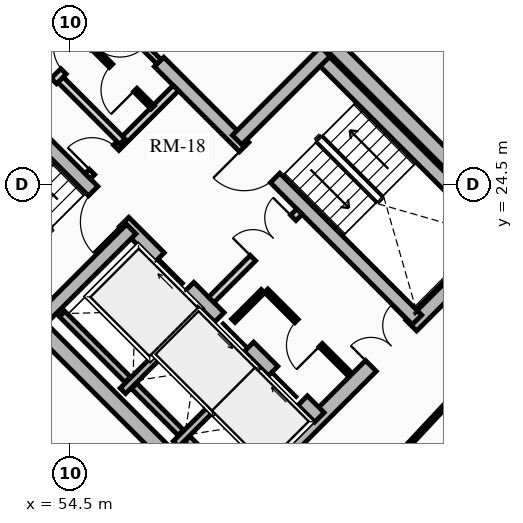
"""IFC4 building model, lengths in metres.
Left out: names, types, materials, properties, quantities, classifications, styles, units other than length and angle.
Written with IfcOpenShell. Run it as: python <this file> out.ifc"""

import sys

from ifc_helpers import new_model, si_unit, direction, frame, frame_2d, origin, place, context, subcontext, project, spatial, rectangle, extrude, source, transform, mapped, element, fill, save


model = new_model("IFC4")
c1 = context("Model", 3, precision=1e-05, world=origin(), true_north=direction((0.0, 1.0)))
c2 = subcontext(c1, "Body", "Model", "MODEL_VIEW")
j1 = project(units=[si_unit("LENGTHUNIT", "METRE"), si_unit("PLANEANGLEUNIT", "RADIAN")], contexts=[c1])
p1 = place(None, origin())
s1 = spatial("IfcSite", under=j1, at=p1, CompositionType="ELEMENT")
p2 = place(p1, origin())
s2 = spatial("IfcBuilding", under=s1, at=p2, CompositionType="ELEMENT")
p3 = place(p2, frame((0.0, 0.0, 202.48)))
s3 = spatial("IfcBuildingStorey", under=s2, at=p3, CompositionType="ELEMENT", Elevation=202.48)
for number, where, z_axis, x_axis in (
    (1, (58.702, 15.732, 0.0), (0.0, 0.0, 1.0), (-0.707, 0.707, 0.0)),
    (2, (66.268, 23.298, 0.0), (0.0, 0.0, 1.0), (-0.707, 0.707, 0.0)),
):
    element("IfcWall", number, at=place(p3, frame(where, z_axis=z_axis, x_axis=x_axis)), inside=s3, PredefinedType="SHEAR", context=c2, shape_type="SweptSolid", body=[
        extrude(rectangle(XDim=14.1, YDim=0.4, at=frame_2d((7.05, 0.0))), origin(), (0.0, 0.0, 1.0), 2.91),
    ])
p4 = place(p3, frame((58.561, 15.873, 0.0), z_axis=(0.0, 0.0, 1.0), x_axis=(0.707106781187, 0.707106781187, 0.0)))
e3 = element("IfcWall", 3, at=p4, inside=s3, PredefinedType="SHEAR", context=c2, shape_type="SweptSolid", body=[
    extrude(rectangle(XDim=10.7, YDim=0.4, at=frame_2d((5.35, 0.0))), origin(), (0.0, 0.0, 1.0), 2.91),
])
m1 = source(origin(), c2, "Body", "SweptSolid", [
    extrude(rectangle(XDim=1.5, YDim=2.02, at=frame_2d((0.75, 1.01))), frame((0.0, 0.21, 0.0), z_axis=(0.0, -1.0, 0.0), x_axis=(1.0, 0.0, 0.0)), (0.0, 0.0, 1.0), 0.42),
])
p5 = place(p4, frame((5.45, 0.0, 0.0)))
e4 = element("IfcOpeningElement", 4, at=p5, cuts=e3, PredefinedType="OPENING", context=c2, shape_type="MappedRepresentation", body=[
    mapped(m1, transform((0.0, 0.0, 0.0), x_axis=(1.0, 0.0, 0.0), y_axis=(0.0, 1.0, 0.0), z_axis=(0.0, 0.0, 1.0), scale=1.0)),
])
p6 = place(p3, frame((48.873, 25.561, 0.0), z_axis=(0.0, 0.0, 1.0), x_axis=(0.707106781187, 0.707106781187, 0.0)))
e5 = element("IfcWall", 5, at=p6, inside=s3, PredefinedType="SHEAR", context=c2, shape_type="SweptSolid", body=[
    extrude(rectangle(XDim=10.7, YDim=0.4, at=frame_2d((5.35, 0.0))), origin(), (0.0, 0.0, 1.0), 2.91),
])
p7 = place(p6, frame((4.6, 0.0, 0.0)))
e6 = element("IfcOpeningElement", 6, at=p7, cuts=e5, PredefinedType="OPENING", context=c2, shape_type="MappedRepresentation", body=[
    mapped(m1, transform((0.0, 0.0, 0.0), x_axis=(1.0, 0.0, 0.0), y_axis=(0.0, 1.0, 0.0), z_axis=(0.0, 0.0, 1.0), scale=1.0)),
])
p8 = place(p3, frame((61.06, 18.373, 0.0), z_axis=(0.0, 0.0, 1.0), x_axis=(-0.707106781187, 0.707106781187, 0.0)))
e7 = element("IfcWall", 7, at=p8, inside=s3, PredefinedType="SHEAR", context=c2, shape_type="SweptSolid", body=[
    extrude(rectangle(XDim=13.7, YDim=0.35, at=frame_2d((6.85, 0.0))), origin(), (0.0, 0.0, 1.0), 2.91),
])
m2 = source(origin(), c2, "Body", "SweptSolid", [
    extrude(rectangle(XDim=1.1, YDim=2.015, at=frame_2d((0.55, 1.007))), frame((0.0, 0.185, 0.0), z_axis=(0.0, -1.0, 0.0), x_axis=(1.0, 0.0, 0.0)), (0.0, 0.0, 1.0), 0.37),
])
p9 = place(p8, frame((4.85, 0.0, 0.0)))
e8 = element("IfcOpeningElement", 8, at=p9, cuts=e7, PredefinedType="OPENING", context=c2, shape_type="MappedRepresentation", body=[
    mapped(m2, transform((0.0, 0.0, 0.0), x_axis=(1.0, 0.0, 0.0), y_axis=(0.0, 1.0, 0.0), z_axis=(0.0, 0.0, 1.0), scale=1.0)),
])
p10 = place(p8, frame((0.625, 0.0, 0.0)))
e9 = element("IfcOpeningElement", 9, at=p10, cuts=e7, PredefinedType="OPENING", context=c2, shape_type="MappedRepresentation", body=[
    mapped(m2, transform((0.0, 0.0, 0.0), x_axis=(1.0, 0.0, 0.0), y_axis=(0.0, 1.0, 0.0), z_axis=(0.0, 0.0, 1.0), scale=1.0)),
])
p11 = place(p8, frame((2.625, 0.0, 0.0)))
e10 = element("IfcOpeningElement", 10, at=p11, cuts=e7, PredefinedType="OPENING", context=c2, shape_type="MappedRepresentation", body=[
    mapped(m2, transform((0.0, 0.0, 0.0), x_axis=(1.0, 0.0, 0.0), y_axis=(0.0, 1.0, 0.0), z_axis=(0.0, 0.0, 1.0), scale=1.0)),
])
m3 = source(origin(), c2, "Body", "SweptSolid", [
    extrude(rectangle(XDim=1.15, YDim=2.02, at=frame_2d((0.575, 1.01))), frame((0.0, 0.185, 0.0), z_axis=(0.0, -1.0, 0.0), x_axis=(1.0, 0.0, 0.0)), (0.0, 0.0, 1.0), 0.37),
])
p12 = place(p8, frame((7.27, 0.0, 0.0)))
e11 = element("IfcOpeningElement", 11, at=p12, cuts=e7, PredefinedType="OPENING", context=c2, shape_type="MappedRepresentation", body=[
    mapped(m3, transform((0.0, 0.0, 0.0), x_axis=(1.0, 0.0, 0.0), y_axis=(0.0, 1.0, 0.0), z_axis=(0.0, 0.0, 1.0), scale=1.0)),
])
p13 = place(p3, frame((63.627, 20.94, 0.0), z_axis=(0.0, 0.0, 1.0), x_axis=(-0.707119496762, 0.707094065383, 0.0)))
e12 = element("IfcWall", 12, at=p13, inside=s3, PredefinedType="SHEAR", context=c2, shape_type="SweptSolid", body=[
    extrude(rectangle(XDim=9.6, YDim=0.35, at=frame_2d((4.8, 0.0))), origin(), (0.0, 0.0, 1.0), 2.91),
])
p14 = place(p13, frame((5.28, 0.0, 0.0)))
e13 = element("IfcOpeningElement", 13, at=p14, cuts=e12, PredefinedType="OPENING", context=c2, shape_type="MappedRepresentation", body=[
    mapped(m3, transform((0.0, 0.0, 0.0), x_axis=(1.0, 0.0, 0.0), y_axis=(0.0, 1.0, 0.0), z_axis=(0.0, 0.0, 1.0), scale=1.0)),
])
p15 = place(p3, frame((53.922, 21.141, 0.0), z_axis=(0.0, 0.0, 1.0), x_axis=(-0.707106781187, 0.707106781187, 0.0)))
e14 = element("IfcWall", 14, at=p15, inside=s3, PredefinedType="SHEAR", context=c2, shape_type="SweptSolid", body=[
    extrude(rectangle(XDim=6.695, YDim=0.35, at=frame_2d((3.348, 0.0))), origin(), (0.0, 0.0, 1.0), 2.91),
])
p16 = place(p3, frame((53.784, 21.003, 0.0), z_axis=(0.0, 0.0, 1.0), x_axis=(0.707106781187, 0.707106781187, 0.0)))
e15 = element("IfcWall", 15, at=p16, inside=s3, PredefinedType="SHEAR", context=c2, shape_type="SweptSolid", body=[
    extrude(rectangle(XDim=3.285, YDim=0.35, at=frame_2d((1.643, 0.0))), origin(), (0.0, 0.0, 1.0), 2.91),
])
p17 = place(p3, frame((65.812, 23.125, 0.0), z_axis=(0.0, 0.0, 1.0), x_axis=(-0.707106781187, 0.707106781187, 0.0)))
e16 = element("IfcWall", 16, at=p17, inside=s3, PredefinedType="SHEAR", context=c2, shape_type="SweptSolid", body=[
    extrude(rectangle(XDim=6.695, YDim=0.35, at=frame_2d((3.348, 0.0))), origin(), (0.0, 0.0, 1.0), 2.91),
])
p18 = place(p3, frame((58.893, 25.674, 0.0), z_axis=(0.0, 0.0, 1.0), x_axis=(0.707106781187, 0.707106781187, 0.0)))
e17 = element("IfcWall", 17, at=p18, inside=s3, PredefinedType="SHEAR", context=c2, shape_type="SweptSolid", body=[
    extrude(rectangle(XDim=3.285, YDim=0.35, at=frame_2d((1.643, 0.0))), origin(), (0.0, 0.0, 1.0), 2.91),
])
p19 = place(p3, frame((55.888, 19.069, 0.0), z_axis=(0.0, 0.0, 1.0), x_axis=(0.707106781187, 0.707106781187, 0.0)))
e18 = element("IfcWall", 18, at=p19, inside=s3, PredefinedType="SHEAR", context=c2, shape_type="SweptSolid", body=[
    extrude(rectangle(XDim=2.97, YDim=0.2, at=frame_2d((1.485, 0.0))), origin(), (0.0, 0.0, 1.0), 2.91),
])
p20 = place(p3, frame((56.015, 19.366, 0.0), z_axis=(0.0, 0.0, 1.0), x_axis=(-0.707106781187, 0.707106781187, 0.0)))
e19 = element("IfcWall", 19, at=p20, inside=s3, PredefinedType="SHEAR", context=c2, shape_type="SweptSolid", body=[
    extrude(rectangle(XDim=2.44, YDim=0.2, at=frame_2d((1.22, 0.0))), origin(), (0.0, 0.0, 1.0), 2.91),
])
p21 = place(p3, frame((57.284, 17.673, 0.0), z_axis=(0.0, 0.0, 1.0), x_axis=(0.707147878904, 0.70706568108, 0.0)))
e20 = element("IfcWall", 20, at=p21, inside=s3, PredefinedType="SHEAR", context=c2, shape_type="SweptSolid", body=[
    extrude(rectangle(XDim=2.97, YDim=0.2, at=frame_2d((1.485, 0.0))), origin(), (0.0, 0.0, 1.0), 2.91),
])
p22 = place(p3, frame((57.412, 17.97, 0.0), z_axis=(0.0, 0.0, 1.0), x_axis=(-0.707106781187, 0.707106781187, 0.0)))
e21 = element("IfcWall", 21, at=p22, inside=s3, PredefinedType="SHEAR", context=c2, shape_type="SweptSolid", body=[
    extrude(rectangle(XDim=1.735, YDim=0.2, at=frame_2d((0.867, 0.0))), origin(), (0.0, 0.0, 1.0), 2.91),
])
p23 = place(p3, frame((58.737, 16.644, 0.0), z_axis=(0.0, 0.0, 1.0), x_axis=(-0.707032117043, 0.707181437447, 0.0)))
e22 = element("IfcWall", 22, at=p23, inside=s3, PredefinedType="SHEAR", context=c2, shape_type="SweptSolid", body=[
    extrude(rectangle(XDim=1.635, YDim=0.2, at=frame_2d((0.817, 0.0))), origin(), (0.0, 0.0, 1.0), 2.91),
])
p24 = place(p3, frame((58.214, 21.467, 0.0), z_axis=(0.0, 0.0, 1.0), x_axis=(0.707106781187, 0.707106781187, 0.0)))
e23 = element("IfcWall", 23, at=p24, inside=s3, PredefinedType="PARTITIONING", context=c2, shape_type="SweptSolid", body=[
    extrude(rectangle(XDim=3.28, YDim=0.2, at=frame_2d((1.64, 0.0))), origin(), (0.0, 0.0, 1.0), 2.685),
])
m4 = source(origin(), c2, "Body", "SweptSolid", [
    extrude(rectangle(XDim=1.5, YDim=2.02, at=frame_2d((0.75, 1.01))), frame((0.0, 0.11, 0.0), z_axis=(0.0, -1.0, 0.0), x_axis=(1.0, 0.0, 0.0)), (0.0, 0.0, 1.0), 0.22),
])
p25 = place(p24, frame((1.55, 0.0, 0.0)))
e24 = element("IfcOpeningElement", 24, at=p25, cuts=e23, PredefinedType="OPENING", context=c2, shape_type="MappedRepresentation", body=[
    mapped(m4, transform((0.0, 0.0, 0.0), x_axis=(1.0, 0.0, 0.0), y_axis=(0.0, 1.0, 0.0), z_axis=(0.0, 0.0, 1.0), scale=1.0)),
])
p26 = place(p3, frame((54.961, 24.719, 0.0), z_axis=(0.0, 0.0, 1.0), x_axis=(0.707106781187, 0.707106781187, 0.0)))
e25 = element("IfcWall", 25, at=p26, inside=s3, PredefinedType="PARTITIONING", context=c2, shape_type="SweptSolid", body=[
    extrude(rectangle(XDim=3.28, YDim=0.2, at=frame_2d((1.64, 0.0))), origin(), (0.0, 0.0, 1.0), 2.685),
])
m5 = source(origin(), c2, "Body", "SweptSolid", [
    extrude(rectangle(XDim=0.9, YDim=2.005, at=frame_2d((0.45, 1.002))), frame((0.0, 0.11, 0.0), z_axis=(0.0, -1.0, 0.0), x_axis=(1.0, 0.0, 0.0)), (0.0, 0.0, 1.0), 0.22),
])
p27 = place(p26, frame((0.16, 0.0, 0.0)))
e26 = element("IfcOpeningElement", 26, at=p27, cuts=e25, PredefinedType="OPENING", context=c2, shape_type="MappedRepresentation", body=[
    mapped(m5, transform((0.0, 0.0, 0.0), x_axis=(1.0, 0.0, 0.0), y_axis=(0.0, 1.0, 0.0), z_axis=(0.0, 0.0, 1.0), scale=1.0)),
])
p28 = place(p3, frame((55.874, 25.631, 0.0), z_axis=(0.0, 0.0, 1.0), x_axis=(-0.707157639372, 0.707055919343, 0.0)))
e27 = element("IfcWall", 27, at=p28, inside=s3, PredefinedType="PARTITIONING", context=c2, shape_type="SweptSolid", body=[
    extrude(rectangle(XDim=2.4, YDim=0.2, at=frame_2d((1.2, 0.0))), origin(), (0.0, 0.0, 1.0), 2.685),
])
p29 = place(p3, frame((53.264, 26.416, 0.0), z_axis=(0.0, 0.0, 1.0), x_axis=(0.707106781187, 0.707106781187, 0.0)))
e28 = element("IfcWall", 28, at=p29, inside=s3, PredefinedType="PARTITIONING", context=c2, shape_type="SweptSolid", body=[
    extrude(rectangle(XDim=3.28, YDim=0.2, at=frame_2d((1.64, 0.0))), origin(), (0.0, 0.0, 1.0), 2.685),
])
m6 = source(origin(), c2, "Body", "SweptSolid", [
    extrude(rectangle(XDim=1.0, YDim=2.015, at=frame_2d((0.5, 1.007))), frame((0.0, 0.11, 0.0), z_axis=(0.0, -1.0, 0.0), x_axis=(1.0, 0.0, 0.0)), (0.0, 0.0, 1.0), 0.22),
])
p30 = place(p29, frame((0.14, 0.0, 0.0)))
e29 = element("IfcOpeningElement", 29, at=p30, cuts=e28, PredefinedType="OPENING", context=c2, shape_type="MappedRepresentation", body=[
    mapped(m6, transform((0.0, 0.0, 0.0), x_axis=(1.0, 0.0, 0.0), y_axis=(0.0, 1.0, 0.0), z_axis=(0.0, 0.0, 1.0), scale=1.0)),
])
p31 = place(p29, frame((1.5, 0.0, 0.0)))
e30 = element("IfcOpeningElement", 30, at=p31, cuts=e28, PredefinedType="OPENING", context=c2, shape_type="MappedRepresentation", body=[
    mapped(m5, transform((0.0, 0.0, 0.0), x_axis=(1.0, 0.0, 0.0), y_axis=(0.0, 1.0, 0.0), z_axis=(0.0, 0.0, 1.0), scale=1.0)),
])
p32 = place(p3, frame((61.835, 19.529, 0.0), z_axis=(0.0, 0.0, 1.0), x_axis=(-0.707146413884, 0.707067146267, 0.0)))
e31 = element("IfcWall", 31, at=p32, inside=s3, PredefinedType="PARTITIONING", context=c2, shape_type="SweptSolid", body=[
    extrude(rectangle(XDim=3.08, YDim=0.125, at=frame_2d((1.54, 0.0))), origin(), (0.0, 0.0, 1.0), 2.685),
])
m7 = source(origin(), c2, "Body", "SweptSolid", [
    extrude(rectangle(XDim=0.9, YDim=2.005, at=frame_2d((0.45, 1.002))), frame((0.0, 0.073, 0.0), z_axis=(0.0, -1.0, 0.0), x_axis=(1.0, 0.0, 0.0)), (0.0, 0.0, 1.0), 0.145),
])
p33 = place(p32, frame((1.05, 0.0, 0.0)))
e32 = element("IfcOpeningElement", 32, at=p33, cuts=e31, PredefinedType="OPENING", context=c2, shape_type="MappedRepresentation", body=[
    mapped(m7, transform((0.0, 0.0, 0.0), x_axis=(1.0, 0.0, 0.0), y_axis=(0.0, 1.0, 0.0), z_axis=(0.0, 0.0, 1.0), scale=1.0)),
])
p34 = place(p3, frame((58.794, 20.915, 0.0), z_axis=(0.0, 0.0, 1.0), x_axis=(0.707106781187, 0.707106781187, 0.0)))
e33 = element("IfcWall", 33, at=p34, inside=s3, PredefinedType="PARTITIONING", context=c2, shape_type="SweptSolid", body=[
    extrude(rectangle(XDim=1.1, YDim=0.125, at=frame_2d((0.55, 0.0))), origin(), (0.0, 0.0, 1.0), 2.685),
])
p35 = place(p3, frame((56.673, 26.529, 0.0), z_axis=(0.0, 0.0, 1.0), x_axis=(-0.707052764397, 0.70716079385, 0.0)))
e34 = element("IfcWall", 34, at=p35, inside=s3, PredefinedType="PARTITIONING", context=c2, shape_type="SweptSolid", body=[
    extrude(rectangle(XDim=2.26, YDim=0.125, at=frame_2d((1.13, 0.0))), origin(), (0.0, 0.0, 1.0), 2.685),
])
p36 = place(p35, frame((0.65, 0.0, 0.0)))
e35 = element("IfcOpeningElement", 35, at=p36, cuts=e34, PredefinedType="OPENING", context=c2, shape_type="MappedRepresentation", body=[
    mapped(m7, transform((0.0, 0.0, 0.0), x_axis=(1.0, 0.0, 0.0), y_axis=(0.0, 1.0, 0.0), z_axis=(0.0, 0.0, 1.0), scale=1.0)),
])
p37 = place(p3, frame((56.839, 27.728, 0.0), z_axis=(0.0, 0.0, 1.0), x_axis=(-0.707106781187, 0.707106781187, 0.0)))
e36 = element("IfcWall", 36, at=p37, inside=s3, PredefinedType="PARTITIONING", context=c2, shape_type="SweptSolid", body=[
    extrude(rectangle(XDim=3.9, YDim=0.16, at=frame_2d((1.95, 0.0))), origin(), (0.0, 0.0, 1.0), 2.685),
])
m8 = source(origin(), c2, "Body", "SweptSolid", [
    extrude(rectangle(XDim=0.9, YDim=2.005, at=frame_2d((0.45, 1.002))), frame((0.0, 0.09, 0.0), z_axis=(0.0, -1.0, 0.0), x_axis=(1.0, 0.0, 0.0)), (0.0, 0.0, 1.0), 0.18),
])
p38 = place(p37, frame((0.55, 0.0, 0.0)))
e37 = element("IfcOpeningElement", 37, at=p38, cuts=e36, PredefinedType="OPENING", context=c2, shape_type="MappedRepresentation", body=[
    mapped(m8, transform((0.0, 0.0, 0.0), x_axis=(1.0, 0.0, 0.0), y_axis=(0.0, 1.0, 0.0), z_axis=(0.0, 0.0, 1.0), scale=1.0)),
])
p39 = place(p37, frame((2.35, 0.0, 0.0)))
e38 = element("IfcOpeningElement", 38, at=p39, cuts=e36, PredefinedType="OPENING", context=c2, shape_type="MappedRepresentation", body=[
    mapped(m8, transform((0.0, 0.0, 0.0), x_axis=(1.0, 0.0, 0.0), y_axis=(0.0, 1.0, 0.0), z_axis=(0.0, 0.0, 1.0), scale=1.0)),
])
p40 = place(p3, frame((52.126, 19.126, 0.0), z_axis=(0.0, 0.0, 1.0), x_axis=(0.698979087027, -0.715142108884, 0.0)))
e39 = element("IfcWall", 39, at=p40, inside=s3, PredefinedType="MOVABLE", context=c2, shape_type="SweptSolid", body=[
    extrude(rectangle(XDim=5.966, YDim=0.1, at=frame_2d((2.983, 0.0))), origin(), (0.0, 0.0, 1.0), 2.322),
])
p41 = place(p3, frame((62.736, 16.924, 0.0), z_axis=(0.0, 0.0, 1.0), x_axis=(0.681946700833, 0.731401871219, 0.0)))
e40 = element("IfcWall", 40, at=p41, inside=s3, PredefinedType="MOVABLE", context=c2, shape_type="SweptSolid", body=[
    extrude(rectangle(XDim=6.393, YDim=0.1, at=frame_2d((3.196, 0.0))), origin(), (0.0, 0.0, 1.0), 2.255),
])
m9 = source(origin(), c2, "Body", "SweptSolid", [
    extrude(rectangle(XDim=1.1, YDim=2.015, at=frame_2d((0.55, 1.007))), frame((0.0, 0.025, 0.0), z_axis=(0.0, -1.0, 0.0), x_axis=(1.0, 0.0, 0.0)), (0.0, 0.0, 1.0), 0.05),
])
p42 = place(p9, origin())
e41 = element("IfcDoor", 41, at=p42, inside=s3, OperationType="SLIDING_TO_RIGHT", PredefinedType="DOOR", context=c2, shape_type="MappedRepresentation", body=[
    mapped(m9, transform((0.0, 0.0, 0.0), x_axis=(1.0, 0.0, 0.0), y_axis=(0.0, 1.0, 0.0), z_axis=(0.0, 0.0, 1.0), scale=1.0)),
])
fill(e8, e41)
p43 = place(p10, origin())
e42 = element("IfcDoor", 42, at=p43, inside=s3, OperationType="SLIDING_TO_RIGHT", PredefinedType="DOOR", context=c2, shape_type="MappedRepresentation", body=[
    mapped(m9, transform((0.0, 0.0, 0.0), x_axis=(1.0, 0.0, 0.0), y_axis=(0.0, 1.0, 0.0), z_axis=(0.0, 0.0, 1.0), scale=1.0)),
])
fill(e9, e42)
p44 = place(p11, origin())
e43 = element("IfcDoor", 43, at=p44, inside=s3, OperationType="SLIDING_TO_LEFT", PredefinedType="DOOR", context=c2, shape_type="MappedRepresentation", body=[
    mapped(m9, transform((0.0, 0.0, 0.0), x_axis=(1.0, 0.0, 0.0), y_axis=(0.0, 1.0, 0.0), z_axis=(0.0, 0.0, 1.0), scale=1.0)),
])
fill(e10, e43)
m10 = source(origin(), c2, "Body", "SweptSolid", [
    extrude(rectangle(XDim=1.15, YDim=2.02, at=frame_2d((0.575, 1.01))), frame((0.0, 0.025, 0.0), z_axis=(0.0, -1.0, 0.0), x_axis=(1.0, 0.0, 0.0)), (0.0, 0.0, 1.0), 0.05),
])
p45 = place(p12, origin())
e44 = element("IfcDoor", 44, at=p45, inside=s3, OperationType="SINGLE_SWING_LEFT", PredefinedType="DOOR", context=c2, shape_type="MappedRepresentation", body=[
    mapped(m10, transform((0.0, 0.0, 0.0), x_axis=(1.0, 0.0, 0.0), y_axis=(0.0, 1.0, 0.0), z_axis=(0.0, 0.0, 1.0), scale=1.0)),
])
fill(e11, e44)
p46 = place(p14, origin())
e45 = element("IfcDoor", 45, at=p46, inside=s3, OperationType="SINGLE_SWING_RIGHT", PredefinedType="DOOR", context=c2, shape_type="MappedRepresentation", body=[
    mapped(m10, transform((0.0, 0.0, 0.0), x_axis=(1.0, 0.0, 0.0), y_axis=(0.0, 1.0, 0.0), z_axis=(0.0, 0.0, 1.0), scale=1.0)),
])
fill(e13, e45)
m11 = source(origin(), c2, "Body", "SweptSolid", [
    extrude(rectangle(XDim=1.5, YDim=2.02, at=frame_2d((0.75, 1.01))), frame((0.0, 0.025, 0.0), z_axis=(0.0, -1.0, 0.0), x_axis=(1.0, 0.0, 0.0)), (0.0, 0.0, 1.0), 0.05),
])
p47 = place(p5, origin())
e46 = element("IfcDoor", 46, at=p47, inside=s3, OperationType="DOUBLE_DOOR_SINGLE_SWING", PredefinedType="DOOR", context=c2, shape_type="MappedRepresentation", body=[
    mapped(m11, transform((0.0, 0.0, 0.0), x_axis=(1.0, 0.0, 0.0), y_axis=(0.0, 1.0, 0.0), z_axis=(0.0, 0.0, 1.0), scale=1.0)),
])
fill(e4, e46)
p48 = place(p25, origin())
e47 = element("IfcDoor", 47, at=p48, inside=s3, OperationType="DOUBLE_DOOR_SINGLE_SWING", PredefinedType="DOOR", context=c2, shape_type="MappedRepresentation", body=[
    mapped(m11, transform((0.0, 0.0, 0.0), x_axis=(1.0, 0.0, 0.0), y_axis=(0.0, 1.0, 0.0), z_axis=(0.0, 0.0, 1.0), scale=1.0)),
])
fill(e24, e47)
m12 = source(origin(), c2, "Body", "SweptSolid", [
    extrude(rectangle(XDim=0.9, YDim=2.005, at=frame_2d((0.45, 1.002))), frame((0.0, 0.025, 0.0), z_axis=(0.0, -1.0, 0.0), x_axis=(1.0, 0.0, 0.0)), (0.0, 0.0, 1.0), 0.05),
])
p49 = place(p27, origin())
e48 = element("IfcDoor", 48, at=p49, inside=s3, OperationType="SINGLE_SWING_LEFT", PredefinedType="DOOR", context=c2, shape_type="MappedRepresentation", body=[
    mapped(m12, transform((0.0, 0.0, 0.0), x_axis=(1.0, 0.0, 0.0), y_axis=(0.0, 1.0, 0.0), z_axis=(0.0, 0.0, 1.0), scale=1.0)),
])
fill(e26, e48)
m13 = source(origin(), c2, "Body", "SweptSolid", [
    extrude(rectangle(XDim=1.0, YDim=2.015, at=frame_2d((0.5, 1.007))), frame((0.0, 0.025, 0.0), z_axis=(0.0, -1.0, 0.0), x_axis=(1.0, 0.0, 0.0)), (0.0, 0.0, 1.0), 0.05),
])
p50 = place(p30, origin())
e49 = element("IfcDoor", 49, at=p50, inside=s3, OperationType="SINGLE_SWING_RIGHT", PredefinedType="DOOR", context=c2, shape_type="MappedRepresentation", body=[
    mapped(m13, transform((0.0, 0.0, 0.0), x_axis=(1.0, 0.0, 0.0), y_axis=(0.0, 1.0, 0.0), z_axis=(0.0, 0.0, 1.0), scale=1.0)),
])
fill(e29, e49)
p51 = place(p33, origin())
e50 = element("IfcDoor", 50, at=p51, inside=s3, OperationType="SINGLE_SWING_LEFT", PredefinedType="DOOR", context=c2, shape_type="MappedRepresentation", body=[
    mapped(m12, transform((0.0, 0.0, 0.0), x_axis=(1.0, 0.0, 0.0), y_axis=(0.0, 1.0, 0.0), z_axis=(0.0, 0.0, 1.0), scale=1.0)),
])
fill(e32, e50)
p52 = place(p31, origin())
e51 = element("IfcDoor", 51, at=p52, inside=s3, OperationType="SINGLE_SWING_RIGHT", PredefinedType="DOOR", context=c2, shape_type="MappedRepresentation", body=[
    mapped(m12, transform((0.0, 0.0, 0.0), x_axis=(1.0, 0.0, 0.0), y_axis=(0.0, 1.0, 0.0), z_axis=(0.0, 0.0, 1.0), scale=1.0)),
])
fill(e30, e51)
p53 = place(p36, origin())
e52 = element("IfcDoor", 52, at=p53, inside=s3, OperationType="SINGLE_SWING_LEFT", PredefinedType="DOOR", context=c2, shape_type="MappedRepresentation", body=[
    mapped(m12, transform((0.0, 0.0, 0.0), x_axis=(1.0, 0.0, 0.0), y_axis=(0.0, 1.0, 0.0), z_axis=(0.0, 0.0, 1.0), scale=1.0)),
])
fill(e35, e52)
save(model, sys.argv[1])
